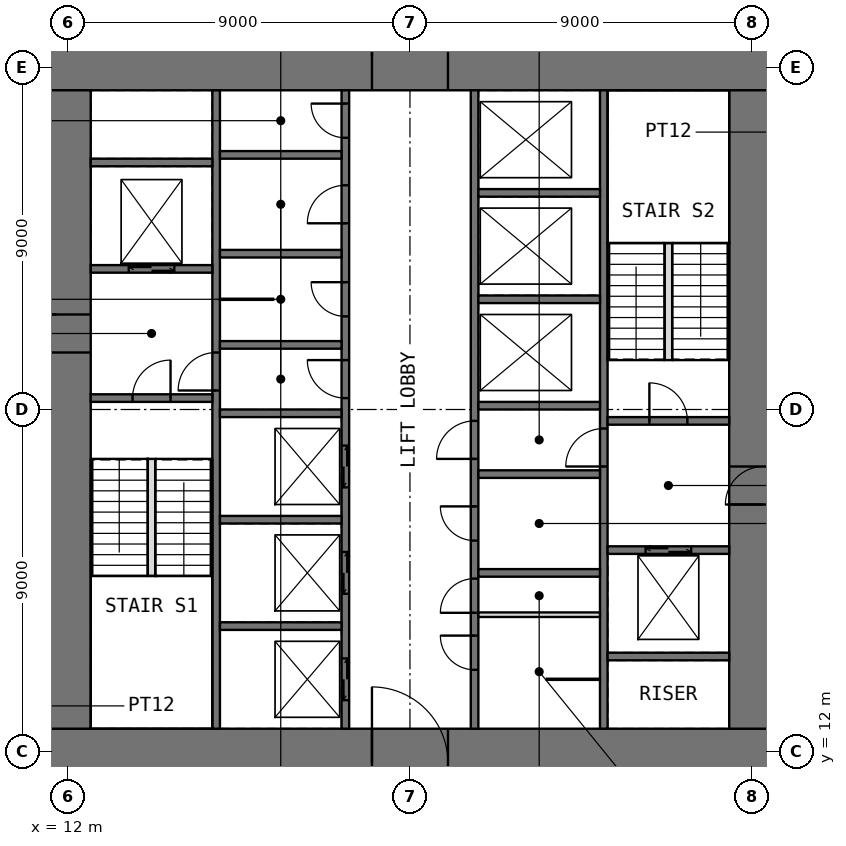
"""IFC4 building model, lengths in metres.
Left out: names, types, materials, properties, quantities, classifications, styles, units other than length and angle.
Written with IfcOpenShell. Run it as: python <this file> out.ifc"""

import sys

from ifc_helpers import new_model, si_unit, direction, frame, frame_2d, origin, place, context, subcontext, project, spatial, rectangle, extrude, element, fill, save


model = new_model("IFC4")
c1 = context("Model", 3, precision=1e-05, world=origin(), true_north=direction((0.0, 1.0)))
c2 = subcontext(c1, "Body", "Model", "MODEL_VIEW")
j1 = project(units=[si_unit("LENGTHUNIT", "METRE"), si_unit("PLANEANGLEUNIT", "RADIAN")], contexts=[c1])
p1 = place(None, origin())
s1 = spatial("IfcSite", under=j1, at=p1, CompositionType="ELEMENT")
p2 = place(p1, origin())
s2 = spatial("IfcBuilding", under=s1, at=p2, CompositionType="ELEMENT")
p3 = place(p2, frame((0.0, 0.0, 46.5)))
s3 = spatial("IfcBuildingStorey", under=s2, at=p3, CompositionType="ELEMENT", Elevation=46.5)
p4 = place(p3, frame((10.8, 11.7, -0.05), z_axis=(0.0, 0.0, 1.0), x_axis=(1.0, 0.0, 0.0)))
e1 = element("IfcWall", 1, at=p4, inside=s3, PredefinedType="SHEAR", context=c2, shape_type="SweptSolid", body=[
    extrude(rectangle(XDim=20.4, YDim=1.8, at=frame_2d((10.2, 0.0))), origin(), (0.0, 0.0, 1.0), 4.0),
])
p5 = place(p4, frame((9.2, 0.0, 0.05)))
e2 = element("IfcOpeningElement", 2, at=p5, cuts=e1, PredefinedType="OPENING", context=c2, shape_type="SweptSolid", body=[
    extrude(rectangle(XDim=2.0, YDim=2.2, at=frame_2d((1.0, 1.1))), frame((0.0, 0.91, 0.0), z_axis=(0.0, -1.0, 0.0), x_axis=(1.0, 0.0, 0.0)), (0.0, 0.0, 1.0), 1.82),
])
p6 = place(p3, frame((10.8, 30.3, -0.05), z_axis=(0.0, 0.0, 1.0), x_axis=(1.0, 0.0, 0.0)))
e3 = element("IfcWall", 3, at=p6, inside=s3, PredefinedType="SHEAR", context=c2, shape_type="SweptSolid", body=[
    extrude(rectangle(XDim=20.4, YDim=1.8, at=frame_2d((10.2, 0.0))), origin(), (0.0, 0.0, 1.0), 4.0),
])
p7 = place(p6, frame((9.2, 0.0, 0.05)))
e4 = element("IfcOpeningElement", 4, at=p7, cuts=e3, PredefinedType="OPENING", context=c2, shape_type="SweptSolid", body=[
    extrude(rectangle(XDim=2.0, YDim=2.2, at=frame_2d((1.0, 1.1))), frame((0.0, 0.91, 0.0), z_axis=(0.0, -1.0, 0.0), x_axis=(1.0, 0.0, 0.0)), (0.0, 0.0, 1.0), 1.82),
])
p8 = place(p3, frame((11.7, 12.6, -0.05), z_axis=(0.0, 0.0, 1.0), x_axis=(0.0, 1.0, 0.0)))
e5 = element("IfcWall", 5, at=p8, inside=s3, PredefinedType="SHEAR", context=c2, shape_type="SweptSolid", body=[
    extrude(rectangle(XDim=16.8, YDim=1.8, at=frame_2d((8.4, 0.0))), origin(), (0.0, 0.0, 1.0), 4.0),
])
p9 = place(p8, frame((9.9, 0.0, 0.05)))
e6 = element("IfcOpeningElement", 6, at=p9, cuts=e5, PredefinedType="OPENING", context=c2, shape_type="SweptSolid", body=[
    extrude(rectangle(XDim=1.0, YDim=2.2, at=frame_2d((0.5, 1.1))), frame((0.0, 0.91, 0.0), z_axis=(0.0, -1.0, 0.0), x_axis=(1.0, 0.0, 0.0)), (0.0, 0.0, 1.0), 1.82),
])
p10 = place(p3, frame((30.3, 12.6, -0.05), z_axis=(0.0, 0.0, 1.0), x_axis=(0.0, 1.0, 0.0)))
e7 = element("IfcWall", 7, at=p10, inside=s3, PredefinedType="SHEAR", context=c2, shape_type="SweptSolid", body=[
    extrude(rectangle(XDim=16.8, YDim=1.8, at=frame_2d((8.4, 0.0))), origin(), (0.0, 0.0, 1.0), 4.0),
])
p11 = place(p10, frame((5.9, 0.0, 0.05)))
e8 = element("IfcOpeningElement", 8, at=p11, cuts=e7, PredefinedType="OPENING", context=c2, shape_type="SweptSolid", body=[
    extrude(rectangle(XDim=1.0, YDim=2.2, at=frame_2d((0.5, 1.1))), frame((0.0, 0.91, 0.0), z_axis=(0.0, -1.0, 0.0), x_axis=(1.0, 0.0, 0.0)), (0.0, 0.0, 1.0), 1.82),
])
p12 = place(p3, frame((15.9, 12.6, -0.05), z_axis=(0.0, 0.0, 1.0), x_axis=(0.0, 1.0, 0.0)))
e9 = element("IfcWall", 9, at=p12, inside=s3, PredefinedType="SHEAR", context=c2, shape_type="SweptSolid", body=[
    extrude(rectangle(XDim=16.8, YDim=0.2, at=frame_2d((8.4, 0.0))), origin(), (0.0, 0.0, 1.0), 4.0),
])
p13 = place(p12, frame((8.9, 0.0, 0.05)))
e10 = element("IfcOpeningElement", 10, at=p13, cuts=e9, PredefinedType="OPENING", context=c2, shape_type="SweptSolid", body=[
    extrude(rectangle(XDim=1.0, YDim=2.2, at=frame_2d((0.5, 1.1))), frame((0.0, 0.11, 0.0), z_axis=(0.0, -1.0, 0.0), x_axis=(1.0, 0.0, 0.0)), (0.0, 0.0, 1.0), 0.22),
])
p14 = place(p3, frame((19.3, 12.6, -0.05), z_axis=(0.0, 0.0, 1.0), x_axis=(0.0, 1.0, 0.0)))
e11 = element("IfcWall", 11, at=p14, inside=s3, PredefinedType="SHEAR", context=c2, shape_type="SweptSolid", body=[
    extrude(rectangle(XDim=16.8, YDim=0.2, at=frame_2d((8.4, 0.0))), origin(), (0.0, 0.0, 1.0), 4.0),
])
p15 = place(p14, frame((8.7, 0.0, 0.05)))
e12 = element("IfcOpeningElement", 12, at=p15, cuts=e11, PredefinedType="OPENING", context=c2, shape_type="SweptSolid", body=[
    extrude(rectangle(XDim=1.0, YDim=2.2, at=frame_2d((0.5, 1.1))), frame((0.0, 0.11, 0.0), z_axis=(0.0, -1.0, 0.0), x_axis=(1.0, 0.0, 0.0)), (0.0, 0.0, 1.0), 0.22),
])
p16 = place(p14, frame((10.85, 0.0, 0.05)))
e13 = element("IfcOpeningElement", 13, at=p16, cuts=e11, PredefinedType="OPENING", context=c2, shape_type="SweptSolid", body=[
    extrude(rectangle(XDim=0.9, YDim=2.2, at=frame_2d((0.45, 1.1))), frame((0.0, 0.11, 0.0), z_axis=(0.0, -1.0, 0.0), x_axis=(1.0, 0.0, 0.0)), (0.0, 0.0, 1.0), 0.22),
])
p17 = place(p14, frame((13.3, 0.0, 0.05)))
e14 = element("IfcOpeningElement", 14, at=p17, cuts=e11, PredefinedType="OPENING", context=c2, shape_type="SweptSolid", body=[
    extrude(rectangle(XDim=1.0, YDim=2.2, at=frame_2d((0.5, 1.1))), frame((0.0, 0.11, 0.0), z_axis=(0.0, -1.0, 0.0), x_axis=(1.0, 0.0, 0.0)), (0.0, 0.0, 1.0), 0.22),
])
p18 = place(p14, frame((15.55, 0.0, 0.05)))
e15 = element("IfcOpeningElement", 15, at=p18, cuts=e11, PredefinedType="OPENING", context=c2, shape_type="SweptSolid", body=[
    extrude(rectangle(XDim=0.9, YDim=2.2, at=frame_2d((0.45, 1.1))), frame((0.0, 0.11, 0.0), z_axis=(0.0, -1.0, 0.0), x_axis=(1.0, 0.0, 0.0)), (0.0, 0.0, 1.0), 0.22),
])
p19 = place(p14, frame((0.75, 0.0, 0.05)))
e16 = element("IfcOpeningElement", 16, at=p19, cuts=e11, PredefinedType="OPENING", context=c2, shape_type="SweptSolid", body=[
    extrude(rectangle(XDim=1.1, YDim=2.2, at=frame_2d((0.55, 1.1))), frame((0.0, 0.11, 0.0), z_axis=(0.0, -1.0, 0.0), x_axis=(1.0, 0.0, 0.0)), (0.0, 0.0, 1.0), 0.22),
])
p20 = place(p14, frame((3.55, 0.0, 0.05)))
e17 = element("IfcOpeningElement", 17, at=p20, cuts=e11, PredefinedType="OPENING", context=c2, shape_type="SweptSolid", body=[
    extrude(rectangle(XDim=1.1, YDim=2.2, at=frame_2d((0.55, 1.1))), frame((0.0, 0.11, 0.0), z_axis=(0.0, -1.0, 0.0), x_axis=(1.0, 0.0, 0.0)), (0.0, 0.0, 1.0), 0.22),
])
p21 = place(p14, frame((6.35, 0.0, 0.05)))
e18 = element("IfcOpeningElement", 18, at=p21, cuts=e11, PredefinedType="OPENING", context=c2, shape_type="SweptSolid", body=[
    extrude(rectangle(XDim=1.1, YDim=2.2, at=frame_2d((0.55, 1.1))), frame((0.0, 0.11, 0.0), z_axis=(0.0, -1.0, 0.0), x_axis=(1.0, 0.0, 0.0)), (0.0, 0.0, 1.0), 0.22),
])
p22 = place(p3, frame((22.7, 12.6, -0.05), z_axis=(0.0, 0.0, 1.0), x_axis=(0.0, 1.0, 0.0)))
e19 = element("IfcWall", 19, at=p22, inside=s3, PredefinedType="SHEAR", context=c2, shape_type="SweptSolid", body=[
    extrude(rectangle(XDim=16.8, YDim=0.2, at=frame_2d((8.4, 0.0))), origin(), (0.0, 0.0, 1.0), 4.0),
])
p23 = place(p22, frame((3.05, 0.0, 0.05)))
e20 = element("IfcOpeningElement", 20, at=p23, cuts=e19, PredefinedType="OPENING", context=c2, shape_type="SweptSolid", body=[
    extrude(rectangle(XDim=0.9, YDim=2.2, at=frame_2d((0.45, 1.1))), frame((0.0, 0.11, 0.0), z_axis=(0.0, -1.0, 0.0), x_axis=(1.0, 0.0, 0.0)), (0.0, 0.0, 1.0), 0.22),
])
p24 = place(p22, frame((7.1, 0.0, 0.05)))
e21 = element("IfcOpeningElement", 21, at=p24, cuts=e19, PredefinedType="OPENING", context=c2, shape_type="SweptSolid", body=[
    extrude(rectangle(XDim=1.0, YDim=2.2, at=frame_2d((0.5, 1.1))), frame((0.0, 0.11, 0.0), z_axis=(0.0, -1.0, 0.0), x_axis=(1.0, 0.0, 0.0)), (0.0, 0.0, 1.0), 0.22),
])
p25 = place(p22, frame((1.55, 0.0, 0.05)))
e22 = element("IfcOpeningElement", 22, at=p25, cuts=e19, PredefinedType="OPENING", context=c2, shape_type="SweptSolid", body=[
    extrude(rectangle(XDim=0.9, YDim=2.2, at=frame_2d((0.45, 1.1))), frame((0.0, 0.11, 0.0), z_axis=(0.0, -1.0, 0.0), x_axis=(1.0, 0.0, 0.0)), (0.0, 0.0, 1.0), 0.22),
])
p26 = place(p22, frame((4.95, 0.0, 0.05)))
e23 = element("IfcOpeningElement", 23, at=p26, cuts=e19, PredefinedType="OPENING", context=c2, shape_type="SweptSolid", body=[
    extrude(rectangle(XDim=0.9, YDim=2.2, at=frame_2d((0.45, 1.1))), frame((0.0, 0.11, 0.0), z_axis=(0.0, -1.0, 0.0), x_axis=(1.0, 0.0, 0.0)), (0.0, 0.0, 1.0), 0.22),
])
p27 = place(p3, frame((26.1, 12.6, -0.05), z_axis=(0.0, 0.0, 1.0), x_axis=(0.0, 1.0, 0.0)))
e24 = element("IfcWall", 24, at=p27, inside=s3, PredefinedType="SHEAR", context=c2, shape_type="SweptSolid", body=[
    extrude(rectangle(XDim=16.8, YDim=0.2, at=frame_2d((8.4, 0.0))), origin(), (0.0, 0.0, 1.0), 4.0),
])
p28 = place(p27, frame((6.9, 0.0, 0.05)))
e25 = element("IfcOpeningElement", 25, at=p28, cuts=e24, PredefinedType="OPENING", context=c2, shape_type="SweptSolid", body=[
    extrude(rectangle(XDim=1.0, YDim=2.2, at=frame_2d((0.5, 1.1))), frame((0.0, 0.11, 0.0), z_axis=(0.0, -1.0, 0.0), x_axis=(1.0, 0.0, 0.0)), (0.0, 0.0, 1.0), 0.22),
])
p29 = place(p3, frame((12.6, 21.3, -0.05), z_axis=(0.0, 0.0, 1.0), x_axis=(1.0, 0.0, 0.0)))
e26 = element("IfcWall", 26, at=p29, inside=s3, PredefinedType="SHEAR", context=c2, shape_type="SweptSolid", body=[
    extrude(rectangle(XDim=3.2, YDim=0.2, at=frame_2d((1.6, 0.0))), origin(), (0.0, 0.0, 1.0), 4.0),
])
p30 = place(p29, frame((1.1, 0.0, 0.05)))
e27 = element("IfcOpeningElement", 27, at=p30, cuts=e26, PredefinedType="OPENING", context=c2, shape_type="SweptSolid", body=[
    extrude(rectangle(XDim=1.0, YDim=2.2, at=frame_2d((0.5, 1.1))), frame((0.0, 0.11, 0.0), z_axis=(0.0, -1.0, 0.0), x_axis=(1.0, 0.0, 0.0)), (0.0, 0.0, 1.0), 0.22),
])
p31 = place(p3, frame((12.6, 24.7, -0.05), z_axis=(0.0, 0.0, 1.0), x_axis=(1.0, 0.0, 0.0)))
e28 = element("IfcWall", 28, at=p31, inside=s3, PredefinedType="SHEAR", context=c2, shape_type="SweptSolid", body=[
    extrude(rectangle(XDim=3.2, YDim=0.2, at=frame_2d((1.6, 0.0))), origin(), (0.0, 0.0, 1.0), 4.0),
])
p32 = place(p31, frame((1.0, 0.0, 0.05)))
e29 = element("IfcOpeningElement", 29, at=p32, cuts=e28, PredefinedType="OPENING", context=c2, shape_type="SweptSolid", body=[
    extrude(rectangle(XDim=1.2, YDim=2.2, at=frame_2d((0.6, 1.1))), frame((0.0, 0.11, 0.0), z_axis=(0.0, -1.0, 0.0), x_axis=(1.0, 0.0, 0.0)), (0.0, 0.0, 1.0), 0.22),
])
for number, where, z_axis, x_axis in (
    (30, (12.6, 27.5, -0.05), (0.0, 0.0, 1.0), (1.0, 0.0, 0.0)),
    (31, (16.0, 15.3, -0.05), (0.0, 0.0, 1.0), (1.0, 0.0, 0.0)),
    (32, (16.0, 18.1, -0.05), (0.0, 0.0, 1.0), (1.0, 0.0, 0.0)),
    (33, (16.0, 20.9, -0.05), (0.0, 0.0, 1.0), (1.0, 0.0, 0.0)),
    (34, (16.0, 22.7, -0.05), (0.0, 0.0, 1.0), (1.0, 0.0, 0.0)),
    (35, (16.0, 25.1, -0.05), (0.0, 0.0, 1.0), (1.0, 0.0, 0.0)),
    (36, (16.0, 27.7, -0.05), (0.0, 0.0, 1.0), (1.0, 0.0, 0.0)),
    (37, (22.8, 16.7, -0.05), (0.0, 0.0, 1.0), (1.0, 0.0, 0.0)),
    (38, (22.8, 19.3, -0.05), (0.0, 0.0, 1.0), (1.0, 0.0, 0.0)),
    (39, (22.8, 21.1, -0.05), (0.0, 0.0, 1.0), (1.0, 0.0, 0.0)),
    (40, (22.8, 23.9, -0.05), (0.0, 0.0, 1.0), (1.0, 0.0, 0.0)),
    (41, (22.8, 26.7, -0.05), (0.0, 0.0, 1.0), (1.0, 0.0, 0.0)),
    (42, (26.2, 14.5, -0.05), (0.0, 0.0, 1.0), (1.0, 0.0, 0.0)),
):
    element("IfcWall", number, at=place(p3, frame(where, z_axis=z_axis, x_axis=x_axis)), inside=s3, PredefinedType="SHEAR", context=c2, shape_type="SweptSolid", body=[
        extrude(rectangle(XDim=3.2, YDim=0.2, at=frame_2d((1.6, 0.0))), origin(), (0.0, 0.0, 1.0), 4.0),
    ])
p33 = place(p3, frame((26.2, 17.3, -0.05), z_axis=(0.0, 0.0, 1.0), x_axis=(1.0, 0.0, 0.0)))
e43 = element("IfcWall", 43, at=p33, inside=s3, PredefinedType="SHEAR", context=c2, shape_type="SweptSolid", body=[
    extrude(rectangle(XDim=3.2, YDim=0.2, at=frame_2d((1.6, 0.0))), origin(), (0.0, 0.0, 1.0), 4.0),
])
p34 = place(p33, frame((1.0, 0.0, 0.05)))
e44 = element("IfcOpeningElement", 44, at=p34, cuts=e43, PredefinedType="OPENING", context=c2, shape_type="SweptSolid", body=[
    extrude(rectangle(XDim=1.2, YDim=2.2, at=frame_2d((0.6, 1.1))), frame((0.0, 0.11, 0.0), z_axis=(0.0, -1.0, 0.0), x_axis=(1.0, 0.0, 0.0)), (0.0, 0.0, 1.0), 0.22),
])
p35 = place(p3, frame((26.2, 20.7, -0.05), z_axis=(0.0, 0.0, 1.0), x_axis=(1.0, 0.0, 0.0)))
e45 = element("IfcWall", 45, at=p35, inside=s3, PredefinedType="SHEAR", context=c2, shape_type="SweptSolid", body=[
    extrude(rectangle(XDim=3.2, YDim=0.2, at=frame_2d((1.6, 0.0))), origin(), (0.0, 0.0, 1.0), 4.0),
])
p36 = place(p35, frame((1.1, 0.0, 0.05)))
e46 = element("IfcOpeningElement", 46, at=p36, cuts=e45, PredefinedType="OPENING", context=c2, shape_type="SweptSolid", body=[
    extrude(rectangle(XDim=1.0, YDim=2.2, at=frame_2d((0.5, 1.1))), frame((0.0, 0.11, 0.0), z_axis=(0.0, -1.0, 0.0), x_axis=(1.0, 0.0, 0.0)), (0.0, 0.0, 1.0), 0.22),
])
p37 = place(p3, frame((22.8, 15.6, 0.0), z_axis=(0.0, 0.0, 1.0), x_axis=(1.0, 0.0, 0.0)))
e47 = element("IfcWall", 47, at=p37, inside=s3, PredefinedType="PARTITIONING", context=c2, shape_type="SweptSolid", body=[
    extrude(rectangle(XDim=3.2, YDim=0.12, at=frame_2d((1.6, 0.0))), origin(), (0.0, 0.0, 1.0), 3.75),
])
for number, where, z_axis, x_axis in (
    (48, (24.6, 13.9, 0.0), (0.0, 0.0, 1.0), (1.0, 0.0, 0.0)),
    (49, (16.0, 23.9, 0.0), (0.0, 0.0, 1.0), (1.0, 0.0, 0.0)),
):
    element("IfcWall", number, at=place(p3, frame(where, z_axis=z_axis, x_axis=x_axis)), inside=s3, PredefinedType="PARTITIONING", context=c2, shape_type="SweptSolid", body=[
        extrude(rectangle(XDim=1.4, YDim=0.03, at=frame_2d((0.7, 0.0))), origin(), (0.0, 0.0, 1.0), 3.75),
    ])
for number, where, z_axis, x_axis in (
    (50, (14.2, 16.62, 0.0), (0.0, 0.0, 1.0), (0.0, 1.0, 0.0)),
    (51, (27.8, 22.3, 0.0), (0.0, 0.0, 1.0), (0.0, 1.0, 0.0)),
):
    element("IfcWall", number, at=place(p3, frame(where, z_axis=z_axis, x_axis=x_axis)), inside=s3, PredefinedType="PARTITIONING", context=c2, shape_type="SweptSolid", body=[
        extrude(rectangle(XDim=3.08, YDim=0.2, at=frame_2d((1.54, 0.0))), origin(), (0.0, 0.0, 1.0), 4.0),
    ])
p38 = place(p5, origin())
e52 = element("IfcDoor", 52, at=p38, inside=s3, OperationType="DOUBLE_DOOR_SINGLE_SWING", PredefinedType="DOOR", context=c2, shape_type="SweptSolid", body=[
    extrude(rectangle(XDim=2.0, YDim=2.2, at=frame_2d((1.0, 1.1))), frame((0.0, 0.025, 0.0), z_axis=(0.0, -1.0, 0.0), x_axis=(1.0, 0.0, 0.0)), (0.0, 0.0, 1.0), 0.05),
])
fill(e2, e52)
p39 = place(p7, origin())
e53 = element("IfcDoor", 53, at=p39, inside=s3, OperationType="DOUBLE_DOOR_SINGLE_SWING", PredefinedType="DOOR", context=c2, shape_type="SweptSolid", body=[
    extrude(rectangle(XDim=2.0, YDim=2.2, at=frame_2d((1.0, 1.1))), frame((0.0, 0.025, 0.0), z_axis=(0.0, -1.0, 0.0), x_axis=(1.0, 0.0, 0.0)), (0.0, 0.0, 1.0), 0.05),
])
fill(e4, e53)
p40 = place(p23, origin())
e54 = element("IfcDoor", 54, at=p40, inside=s3, OperationType="SINGLE_SWING_LEFT", PredefinedType="DOOR", context=c2, shape_type="SweptSolid", body=[
    extrude(rectangle(XDim=0.9, YDim=2.2, at=frame_2d((0.45, 1.1))), frame((0.0, 0.025, 0.0), z_axis=(0.0, -1.0, 0.0), x_axis=(1.0, 0.0, 0.0)), (0.0, 0.0, 1.0), 0.05),
])
fill(e20, e54)
p41 = place(p9, origin())
e55 = element("IfcDoor", 55, at=p41, inside=s3, OperationType="SINGLE_SWING_RIGHT", PredefinedType="DOOR", context=c2, shape_type="SweptSolid", body=[
    extrude(rectangle(XDim=1.0, YDim=2.2, at=frame_2d((0.5, 1.1))), frame((0.0, 0.025, 0.0), z_axis=(0.0, -1.0, 0.0), x_axis=(1.0, 0.0, 0.0)), (0.0, 0.0, 1.0), 0.05),
])
fill(e6, e55)
p42 = place(p11, origin())
e56 = element("IfcDoor", 56, at=p42, inside=s3, OperationType="SINGLE_SWING_LEFT", PredefinedType="DOOR", context=c2, shape_type="SweptSolid", body=[
    extrude(rectangle(XDim=1.0, YDim=2.2, at=frame_2d((0.5, 1.1))), frame((0.0, 0.025, 0.0), z_axis=(0.0, -1.0, 0.0), x_axis=(1.0, 0.0, 0.0)), (0.0, 0.0, 1.0), 0.05),
])
fill(e8, e56)
p43 = place(p30, origin())
e57 = element("IfcDoor", 57, at=p43, inside=s3, OperationType="SINGLE_SWING_RIGHT", PredefinedType="DOOR", context=c2, shape_type="SweptSolid", body=[
    extrude(rectangle(XDim=1.0, YDim=2.2, at=frame_2d((0.5, 1.1))), frame((0.0, 0.025, 0.0), z_axis=(0.0, -1.0, 0.0), x_axis=(1.0, 0.0, 0.0)), (0.0, 0.0, 1.0), 0.05),
])
fill(e27, e57)
p44 = place(p36, origin())
e58 = element("IfcDoor", 58, at=p44, inside=s3, OperationType="SINGLE_SWING_LEFT", PredefinedType="DOOR", context=c2, shape_type="SweptSolid", body=[
    extrude(rectangle(XDim=1.0, YDim=2.2, at=frame_2d((0.5, 1.1))), frame((0.0, 0.025, 0.0), z_axis=(0.0, -1.0, 0.0), x_axis=(1.0, 0.0, 0.0)), (0.0, 0.0, 1.0), 0.05),
])
fill(e46, e58)
p45 = place(p13, origin())
e59 = element("IfcDoor", 59, at=p45, inside=s3, OperationType="SINGLE_SWING_LEFT", PredefinedType="DOOR", context=c2, shape_type="SweptSolid", body=[
    extrude(rectangle(XDim=1.0, YDim=2.2, at=frame_2d((0.5, 1.1))), frame((0.0, 0.025, 0.0), z_axis=(0.0, -1.0, 0.0), x_axis=(1.0, 0.0, 0.0)), (0.0, 0.0, 1.0), 0.05),
])
fill(e10, e59)
p46 = place(p28, origin())
e60 = element("IfcDoor", 60, at=p46, inside=s3, OperationType="SINGLE_SWING_LEFT", PredefinedType="DOOR", context=c2, shape_type="SweptSolid", body=[
    extrude(rectangle(XDim=1.0, YDim=2.2, at=frame_2d((0.5, 1.1))), frame((0.0, 0.025, 0.0), z_axis=(0.0, -1.0, 0.0), x_axis=(1.0, 0.0, 0.0)), (0.0, 0.0, 1.0), 0.05),
])
fill(e25, e60)
p47 = place(p15, origin())
e61 = element("IfcDoor", 61, at=p47, inside=s3, OperationType="SINGLE_SWING_RIGHT", PredefinedType="DOOR", context=c2, shape_type="SweptSolid", body=[
    extrude(rectangle(XDim=1.0, YDim=2.2, at=frame_2d((0.5, 1.1))), frame((0.0, 0.025, 0.0), z_axis=(0.0, -1.0, 0.0), x_axis=(1.0, 0.0, 0.0)), (0.0, 0.0, 1.0), 0.05),
])
fill(e12, e61)
p48 = place(p24, origin())
e62 = element("IfcDoor", 62, at=p48, inside=s3, OperationType="SINGLE_SWING_LEFT", PredefinedType="DOOR", context=c2, shape_type="SweptSolid", body=[
    extrude(rectangle(XDim=1.0, YDim=2.2, at=frame_2d((0.5, 1.1))), frame((0.0, 0.025, 0.0), z_axis=(0.0, -1.0, 0.0), x_axis=(1.0, 0.0, 0.0)), (0.0, 0.0, 1.0), 0.05),
])
fill(e21, e62)
p49 = place(p16, origin())
e63 = element("IfcDoor", 63, at=p49, inside=s3, OperationType="SINGLE_SWING_RIGHT", PredefinedType="DOOR", context=c2, shape_type="SweptSolid", body=[
    extrude(rectangle(XDim=0.9, YDim=2.2, at=frame_2d((0.45, 1.1))), frame((0.0, 0.025, 0.0), z_axis=(0.0, -1.0, 0.0), x_axis=(1.0, 0.0, 0.0)), (0.0, 0.0, 1.0), 0.05),
])
fill(e13, e63)
p50 = place(p17, origin())
e64 = element("IfcDoor", 64, at=p50, inside=s3, OperationType="SINGLE_SWING_LEFT", PredefinedType="DOOR", context=c2, shape_type="SweptSolid", body=[
    extrude(rectangle(XDim=1.0, YDim=2.2, at=frame_2d((0.5, 1.1))), frame((0.0, 0.025, 0.0), z_axis=(0.0, -1.0, 0.0), x_axis=(1.0, 0.0, 0.0)), (0.0, 0.0, 1.0), 0.05),
])
fill(e14, e64)
p51 = place(p18, origin())
e65 = element("IfcDoor", 65, at=p51, inside=s3, OperationType="SINGLE_SWING_RIGHT", PredefinedType="DOOR", context=c2, shape_type="SweptSolid", body=[
    extrude(rectangle(XDim=0.9, YDim=2.2, at=frame_2d((0.45, 1.1))), frame((0.0, 0.025, 0.0), z_axis=(0.0, -1.0, 0.0), x_axis=(1.0, 0.0, 0.0)), (0.0, 0.0, 1.0), 0.05),
])
fill(e15, e65)
p52 = place(p25, origin())
e66 = element("IfcDoor", 66, at=p52, inside=s3, OperationType="SINGLE_SWING_RIGHT", PredefinedType="DOOR", context=c2, shape_type="SweptSolid", body=[
    extrude(rectangle(XDim=0.9, YDim=2.2, at=frame_2d((0.45, 1.1))), frame((0.0, 0.025, 0.0), z_axis=(0.0, -1.0, 0.0), x_axis=(1.0, 0.0, 0.0)), (0.0, 0.0, 1.0), 0.05),
])
fill(e22, e66)
p53 = place(p26, origin())
e67 = element("IfcDoor", 67, at=p53, inside=s3, OperationType="SINGLE_SWING_RIGHT", PredefinedType="DOOR", context=c2, shape_type="SweptSolid", body=[
    extrude(rectangle(XDim=0.9, YDim=2.2, at=frame_2d((0.45, 1.1))), frame((0.0, 0.025, 0.0), z_axis=(0.0, -1.0, 0.0), x_axis=(1.0, 0.0, 0.0)), (0.0, 0.0, 1.0), 0.05),
])
fill(e23, e67)
p54 = place(p19, origin())
e68 = element("IfcDoor", 68, at=p54, inside=s3, OperationType="DOUBLE_DOOR_SLIDING", PredefinedType="DOOR", context=c2, shape_type="SweptSolid", body=[
    extrude(rectangle(XDim=1.1, YDim=2.2, at=frame_2d((0.55, 1.1))), frame((0.0, 0.025, 0.0), z_axis=(0.0, -1.0, 0.0), x_axis=(1.0, 0.0, 0.0)), (0.0, 0.0, 1.0), 0.05),
])
fill(e16, e68)
p55 = place(p20, origin())
e69 = element("IfcDoor", 69, at=p55, inside=s3, OperationType="DOUBLE_DOOR_SLIDING", PredefinedType="DOOR", context=c2, shape_type="SweptSolid", body=[
    extrude(rectangle(XDim=1.1, YDim=2.2, at=frame_2d((0.55, 1.1))), frame((0.0, 0.025, 0.0), z_axis=(0.0, -1.0, 0.0), x_axis=(1.0, 0.0, 0.0)), (0.0, 0.0, 1.0), 0.05),
])
fill(e17, e69)
p56 = place(p21, origin())
e70 = element("IfcDoor", 70, at=p56, inside=s3, OperationType="DOUBLE_DOOR_SLIDING", PredefinedType="DOOR", context=c2, shape_type="SweptSolid", body=[
    extrude(rectangle(XDim=1.1, YDim=2.2, at=frame_2d((0.55, 1.1))), frame((0.0, 0.025, 0.0), z_axis=(0.0, -1.0, 0.0), x_axis=(1.0, 0.0, 0.0)), (0.0, 0.0, 1.0), 0.05),
])
fill(e18, e70)
p57 = place(p32, origin())
e71 = element("IfcDoor", 71, at=p57, inside=s3, OperationType="DOUBLE_DOOR_SLIDING", PredefinedType="DOOR", context=c2, shape_type="SweptSolid", body=[
    extrude(rectangle(XDim=1.2, YDim=2.2, at=frame_2d((0.6, 1.1))), frame((0.0, 0.025, 0.0), z_axis=(0.0, -1.0, 0.0), x_axis=(1.0, 0.0, 0.0)), (0.0, 0.0, 1.0), 0.05),
])
fill(e29, e71)
p58 = place(p34, origin())
e72 = element("IfcDoor", 72, at=p58, inside=s3, OperationType="DOUBLE_DOOR_SLIDING", PredefinedType="DOOR", context=c2, shape_type="SweptSolid", body=[
    extrude(rectangle(XDim=1.2, YDim=2.2, at=frame_2d((0.6, 1.1))), frame((0.0, 0.025, 0.0), z_axis=(0.0, -1.0, 0.0), x_axis=(1.0, 0.0, 0.0)), (0.0, 0.0, 1.0), 0.05),
])
fill(e44, e72)
save(model, sys.argv[1])
